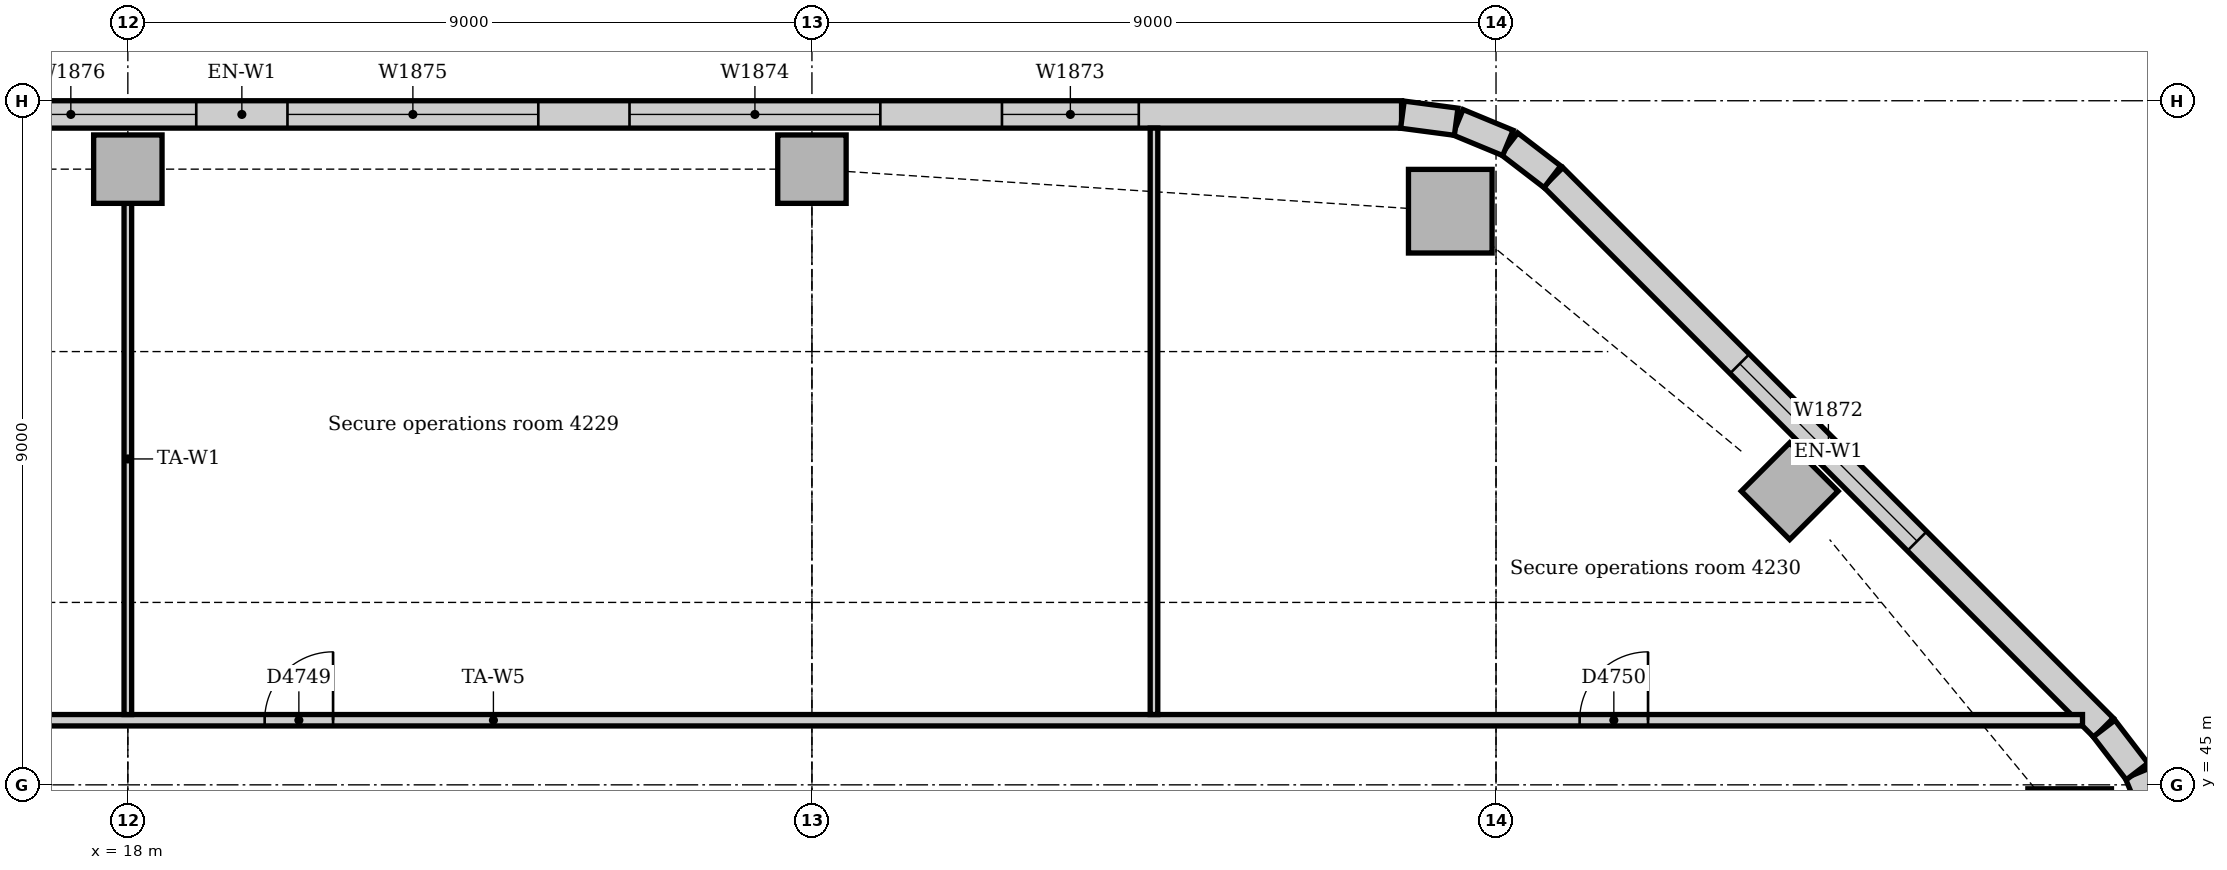
"""IFC4 building model, lengths in metres.
Left out: names, types, materials, properties, quantities, classifications, styles, units other than length and angle.
Written with IfcOpenShell. Run it as: python <this file> out.ifc"""

import sys

from ifc_helpers import new_model, si_unit, direction, frame, frame_2d, origin, origin_2d, place, context, subcontext, project, spatial, rectangle, extrude, element, fill, save


model = new_model("IFC4")
c1 = context("Model", 3, precision=1e-05, world=origin(), true_north=direction((0.0, 1.0)))
c2 = subcontext(c1, "Body", "Model", "MODEL_VIEW")
j1 = project(units=[si_unit("LENGTHUNIT", "METRE"), si_unit("PLANEANGLEUNIT", "RADIAN")], contexts=[c1])
p1 = place(None, origin())
s1 = spatial("IfcSite", under=j1, at=p1, CompositionType="ELEMENT")
p2 = place(p1, origin())
s2 = spatial("IfcBuilding", under=s1, at=p2, CompositionType="ELEMENT")
p3 = place(p2, frame((0.0, 0.0, 177.0)))
s3 = spatial("IfcBuildingStorey", under=s2, at=p3, CompositionType="ELEMENT", Elevation=177.0)
for number, where, z_axis, x_axis in (
    (1, (43.547, 44.398, 0.0), (0.0, 0.0, 1.0), (1.0, 0.0, 0.0)),
    (2, (35.398, 52.547, 0.0), (0.0, 0.0, 1.0), (1.0, 0.0, 0.0)),
):
    element("IfcColumn", number, at=place(p3, frame(where, z_axis=z_axis, x_axis=x_axis)), inside=s3, PredefinedType="COLUMN", context=c2, shape_type="SweptSolid", body=[
        extrude(rectangle(XDim=1.1, YDim=1.1, at=origin_2d()), origin(), (0.0, 0.0, 1.0), 3.85),
    ])
for number, where, z_axis, x_axis in (
    (3, (39.864, 48.864, 0.0), (0.0, 0.0, 1.0), (0.707, 0.707, 0.0)),
    (4, (18.0, 53.1, 0.0), (0.0, 0.0, 1.0), (1.0, 0.0, 0.0)),
    (5, (27.0, 53.1, 0.0), (0.0, 0.0, 1.0), (1.0, 0.0, 0.0)),
):
    element("IfcColumn", number, at=place(p3, frame(where, z_axis=z_axis, x_axis=x_axis)), inside=s3, PredefinedType="COLUMN", context=c2, shape_type="SweptSolid", body=[
        extrude(rectangle(XDim=0.9, YDim=0.9, at=origin_2d()), origin(), (0.0, 0.0, 1.0), 3.85),
    ])
p4 = place(p3, frame((43.994, 45.751, 0.0), z_axis=(0.0, 0.0, 1.0), x_axis=(-0.707106781187, 0.707106781187, 0.0)))
e6 = element("IfcWall", 6, at=p4, inside=s3, PredefinedType="STANDARD", context=c2, shape_type="SweptSolid", body=[
    extrude(rectangle(XDim=10.243, YDim=0.36, at=frame_2d((5.121, 0.0))), origin(), (0.0, 0.0, 1.0), 3.85),
])
p5 = place(p4, frame((3.471, 0.0, 0.9)))
e7 = element("IfcOpeningElement", 7, at=p5, cuts=e6, PredefinedType="OPENING", context=c2, shape_type="SweptSolid", body=[
    extrude(rectangle(XDim=3.3, YDim=1.6, at=frame_2d((1.65, 0.8))), frame((0.0, 0.19, 0.0), z_axis=(0.0, -1.0, 0.0), x_axis=(1.0, 0.0, 0.0)), (0.0, 0.0, 1.0), 0.38),
])
p6 = place(p3, frame((34.757, 53.82, 0.0), z_axis=(0.0, 0.0, 1.0), x_axis=(-1.0, 0.0, 0.0)))
e8 = element("IfcWall", 8, at=p6, inside=s3, PredefinedType="STANDARD", context=c2, shape_type="SweptSolid", body=[
    extrude(rectangle(XDim=30.515, YDim=0.36, at=frame_2d((15.257, 0.0))), origin(), (0.0, 0.0, 1.0), 3.85),
])
p7 = place(p6, frame((3.457, 0.0, 0.9)))
e9 = element("IfcOpeningElement", 9, at=p7, cuts=e8, PredefinedType="OPENING", context=c2, shape_type="SweptSolid", body=[
    extrude(rectangle(XDim=1.8, YDim=1.6, at=frame_2d((0.9, 0.8))), frame((0.0, 0.19, 0.0), z_axis=(0.0, -1.0, 0.0), x_axis=(1.0, 0.0, 0.0)), (0.0, 0.0, 1.0), 0.38),
])
p8 = place(p6, frame((6.857, 0.0, 0.9)))
e10 = element("IfcOpeningElement", 10, at=p8, cuts=e8, PredefinedType="OPENING", context=c2, shape_type="SweptSolid", body=[
    extrude(rectangle(XDim=3.3, YDim=1.6, at=frame_2d((1.65, 0.8))), frame((0.0, 0.19, 0.0), z_axis=(0.0, -1.0, 0.0), x_axis=(1.0, 0.0, 0.0)), (0.0, 0.0, 1.0), 0.38),
])
p9 = place(p6, frame((11.357, 0.0, 0.9)))
e11 = element("IfcOpeningElement", 11, at=p9, cuts=e8, PredefinedType="OPENING", context=c2, shape_type="SweptSolid", body=[
    extrude(rectangle(XDim=3.3, YDim=1.6, at=frame_2d((1.65, 0.8))), frame((0.0, 0.19, 0.0), z_axis=(0.0, -1.0, 0.0), x_axis=(1.0, 0.0, 0.0)), (0.0, 0.0, 1.0), 0.38),
])
p10 = place(p6, frame((15.857, 0.0, 0.9)))
e12 = element("IfcOpeningElement", 12, at=p10, cuts=e8, PredefinedType="OPENING", context=c2, shape_type="SweptSolid", body=[
    extrude(rectangle(XDim=3.3, YDim=1.6, at=frame_2d((1.65, 0.8))), frame((0.0, 0.19, 0.0), z_axis=(0.0, -1.0, 0.0), x_axis=(1.0, 0.0, 0.0)), (0.0, 0.0, 1.0), 0.38),
])
p11 = place(p6, frame((20.357, 0.0, 0.9)))
e13 = element("IfcOpeningElement", 13, at=p11, cuts=e8, PredefinedType="OPENING", context=c2, shape_type="SweptSolid", body=[
    extrude(rectangle(XDim=3.3, YDim=1.6, at=frame_2d((1.65, 0.8))), frame((0.0, 0.19, 0.0), z_axis=(0.0, -1.0, 0.0), x_axis=(1.0, 0.0, 0.0)), (0.0, 0.0, 1.0), 0.38),
])
p12 = place(p6, frame((24.857, 0.0, 0.9)))
e14 = element("IfcOpeningElement", 14, at=p12, cuts=e8, PredefinedType="OPENING", context=c2, shape_type="SweptSolid", body=[
    extrude(rectangle(XDim=3.3, YDim=1.6, at=frame_2d((1.65, 0.8))), frame((0.0, 0.19, 0.0), z_axis=(0.0, -1.0, 0.0), x_axis=(1.0, 0.0, 0.0)), (0.0, 0.0, 1.0), 0.38),
])
p13 = place(p3, frame((44.718, 44.497, 0.0), z_axis=(0.0, 0.0, 1.0), x_axis=(-0.382702709855, 0.923871547278, 0.0)))
e15 = element("IfcWall", 15, at=p13, inside=s3, PredefinedType="STANDARD", context=c2, shape_type="SweptSolid", body=[
    extrude(rectangle(XDim=0.713, YDim=0.36, at=frame_2d((0.356, 0.0))), origin(), (0.0, 0.0, 1.0), 3.85),
])
for number, where, z_axis, x_axis in (
    (16, (44.434, 45.175, 0.0), (0.0, 0.0, 1.0), (-0.609, 0.793, 0.0)),
    (17, (36.741, 53.0, 0.0), (0.0, 0.0, 1.0), (-0.793, 0.609, 0.0)),
):
    element("IfcWall", number, at=place(p3, frame(where, z_axis=z_axis, x_axis=x_axis)), inside=s3, PredefinedType="STANDARD", context=c2, shape_type="SweptSolid", body=[
        extrude(rectangle(XDim=0.713, YDim=0.36, at=frame_2d((0.357, 0.0))), origin(), (0.0, 0.0, 1.0), 3.85),
    ])
for number, where, z_axis, x_axis in (
    (18, (36.156, 53.445, 0.0), (0.0, 0.0, 1.0), (-0.924, 0.383, 0.0)),
    (19, (35.476, 53.724, 0.0), (0.0, 0.0, 1.0), (-0.991, 0.131, 0.0)),
):
    element("IfcWall", number, at=place(p3, frame(where, z_axis=z_axis, x_axis=x_axis)), inside=s3, PredefinedType="STANDARD", context=c2, shape_type="SweptSolid", body=[
        extrude(rectangle(XDim=0.713, YDim=0.36, at=frame_2d((0.356, 0.0))), origin(), (0.0, 0.0, 1.0), 3.85),
    ])
p14 = place(p3, frame((1.903, 45.85, 0.0), z_axis=(0.0, 0.0, 1.0), x_axis=(1.0, 0.0, 0.0)))
e20 = element("IfcWall", 20, at=p14, inside=s3, PredefinedType="PARTITIONING", context=c2, shape_type="SweptSolid", body=[
    extrude(rectangle(XDim=41.813, YDim=0.15, at=frame_2d((20.906, 0.0))), origin(), (0.0, 0.0, 1.0), 3.85),
])
p15 = place(p14, frame((7.65, 0.0, 0.0)))
e21 = element("IfcOpeningElement", 21, at=p15, cuts=e20, PredefinedType="OPENING", context=c2, shape_type="SweptSolid", body=[
    extrude(rectangle(XDim=0.9, YDim=2.1, at=frame_2d((0.45, 1.05))), frame((0.0, 0.085, 0.0), z_axis=(0.0, -1.0, 0.0), x_axis=(1.0, 0.0, 0.0)), (0.0, 0.0, 1.0), 0.17),
])
p16 = place(p14, frame((17.897, 0.0, 0.0)))
e22 = element("IfcOpeningElement", 22, at=p16, cuts=e20, PredefinedType="OPENING", context=c2, shape_type="SweptSolid", body=[
    extrude(rectangle(XDim=0.9, YDim=2.1, at=frame_2d((0.45, 1.05))), frame((0.0, 0.085, 0.0), z_axis=(0.0, -1.0, 0.0), x_axis=(1.0, 0.0, 0.0)), (0.0, 0.0, 1.0), 0.17),
])
p17 = place(p14, frame((35.197, 0.0, 0.0)))
e23 = element("IfcOpeningElement", 23, at=p17, cuts=e20, PredefinedType="OPENING", context=c2, shape_type="SweptSolid", body=[
    extrude(rectangle(XDim=0.9, YDim=2.1, at=frame_2d((0.45, 1.05))), frame((0.0, 0.085, 0.0), z_axis=(0.0, -1.0, 0.0), x_axis=(1.0, 0.0, 0.0)), (0.0, 0.0, 1.0), 0.17),
])
p18 = place(p3, frame((18.0, 45.925, 0.0), z_axis=(0.0, 0.0, 1.0), x_axis=(0.0, 1.0, 0.0)))
e24 = element("IfcWall", 24, at=p18, inside=s3, PredefinedType="PARTITIONING", context=c2, shape_type="SweptSolid", body=[
    extrude(rectangle(XDim=6.725, YDim=0.1, at=frame_2d((3.362, 0.0))), origin(), (0.0, 0.0, 1.0), 3.362),
])
p19 = place(p3, frame((31.5, 45.925, 0.0), z_axis=(0.0, 0.0, 1.0), x_axis=(0.0, 1.0, 0.0)))
e25 = element("IfcWall", 25, at=p19, inside=s3, PredefinedType="PARTITIONING", context=c2, shape_type="SweptSolid", body=[
    extrude(rectangle(XDim=7.715, YDim=0.1, at=frame_2d((3.857, 0.0))), origin(), (0.0, 0.0, 1.0), 3.85),
])
p20 = place(p5, origin())
e26 = element("IfcWindow", 26, at=p20, inside=s3, PartitioningType="SINGLE_PANEL", PredefinedType="WINDOW", context=c2, shape_type="SweptSolid", body=[
    extrude(rectangle(XDim=3.3, YDim=1.6, at=frame_2d((1.65, 0.8))), frame((0.0, 0.13, 0.0), z_axis=(0.0, -1.0, 0.0), x_axis=(1.0, 0.0, 0.0)), (0.0, 0.0, 1.0), 0.06),
])
fill(e7, e26)
p21 = place(p7, origin())
e27 = element("IfcWindow", 27, at=p21, inside=s3, PartitioningType="SINGLE_PANEL", PredefinedType="WINDOW", context=c2, shape_type="SweptSolid", body=[
    extrude(rectangle(XDim=1.8, YDim=1.6, at=frame_2d((0.9, 0.8))), frame((0.0, 0.13, 0.0), z_axis=(0.0, -1.0, 0.0), x_axis=(1.0, 0.0, 0.0)), (0.0, 0.0, 1.0), 0.06),
])
fill(e9, e27)
p22 = place(p8, origin())
e28 = element("IfcWindow", 28, at=p22, inside=s3, PartitioningType="SINGLE_PANEL", PredefinedType="WINDOW", context=c2, shape_type="SweptSolid", body=[
    extrude(rectangle(XDim=3.3, YDim=1.6, at=frame_2d((1.65, 0.8))), frame((0.0, 0.13, 0.0), z_axis=(0.0, -1.0, 0.0), x_axis=(1.0, 0.0, 0.0)), (0.0, 0.0, 1.0), 0.06),
])
fill(e10, e28)
p23 = place(p9, origin())
e29 = element("IfcWindow", 29, at=p23, inside=s3, PartitioningType="SINGLE_PANEL", PredefinedType="WINDOW", context=c2, shape_type="SweptSolid", body=[
    extrude(rectangle(XDim=3.3, YDim=1.6, at=frame_2d((1.65, 0.8))), frame((0.0, 0.13, 0.0), z_axis=(0.0, -1.0, 0.0), x_axis=(1.0, 0.0, 0.0)), (0.0, 0.0, 1.0), 0.06),
])
fill(e11, e29)
p24 = place(p10, origin())
e30 = element("IfcWindow", 30, at=p24, inside=s3, PartitioningType="SINGLE_PANEL", PredefinedType="WINDOW", context=c2, shape_type="SweptSolid", body=[
    extrude(rectangle(XDim=3.3, YDim=1.6, at=frame_2d((1.65, 0.8))), frame((0.0, 0.13, 0.0), z_axis=(0.0, -1.0, 0.0), x_axis=(1.0, 0.0, 0.0)), (0.0, 0.0, 1.0), 0.06),
])
fill(e12, e30)
p25 = place(p16, origin())
e31 = element("IfcDoor", 31, at=p25, inside=s3, OperationType="SINGLE_SWING_RIGHT", PredefinedType="DOOR", context=c2, shape_type="SweptSolid", body=[
    extrude(rectangle(XDim=0.9, YDim=2.1, at=frame_2d((0.45, 1.05))), frame((0.0, 0.025, 0.0), z_axis=(0.0, -1.0, 0.0), x_axis=(1.0, 0.0, 0.0)), (0.0, 0.0, 1.0), 0.05),
])
fill(e22, e31)
p26 = place(p17, origin())
e32 = element("IfcDoor", 32, at=p26, inside=s3, OperationType="SINGLE_SWING_RIGHT", PredefinedType="DOOR", context=c2, shape_type="SweptSolid", body=[
    extrude(rectangle(XDim=0.9, YDim=2.1, at=frame_2d((0.45, 1.05))), frame((0.0, 0.025, 0.0), z_axis=(0.0, -1.0, 0.0), x_axis=(1.0, 0.0, 0.0)), (0.0, 0.0, 1.0), 0.05),
])
fill(e23, e32)
save(model, sys.argv[1])
